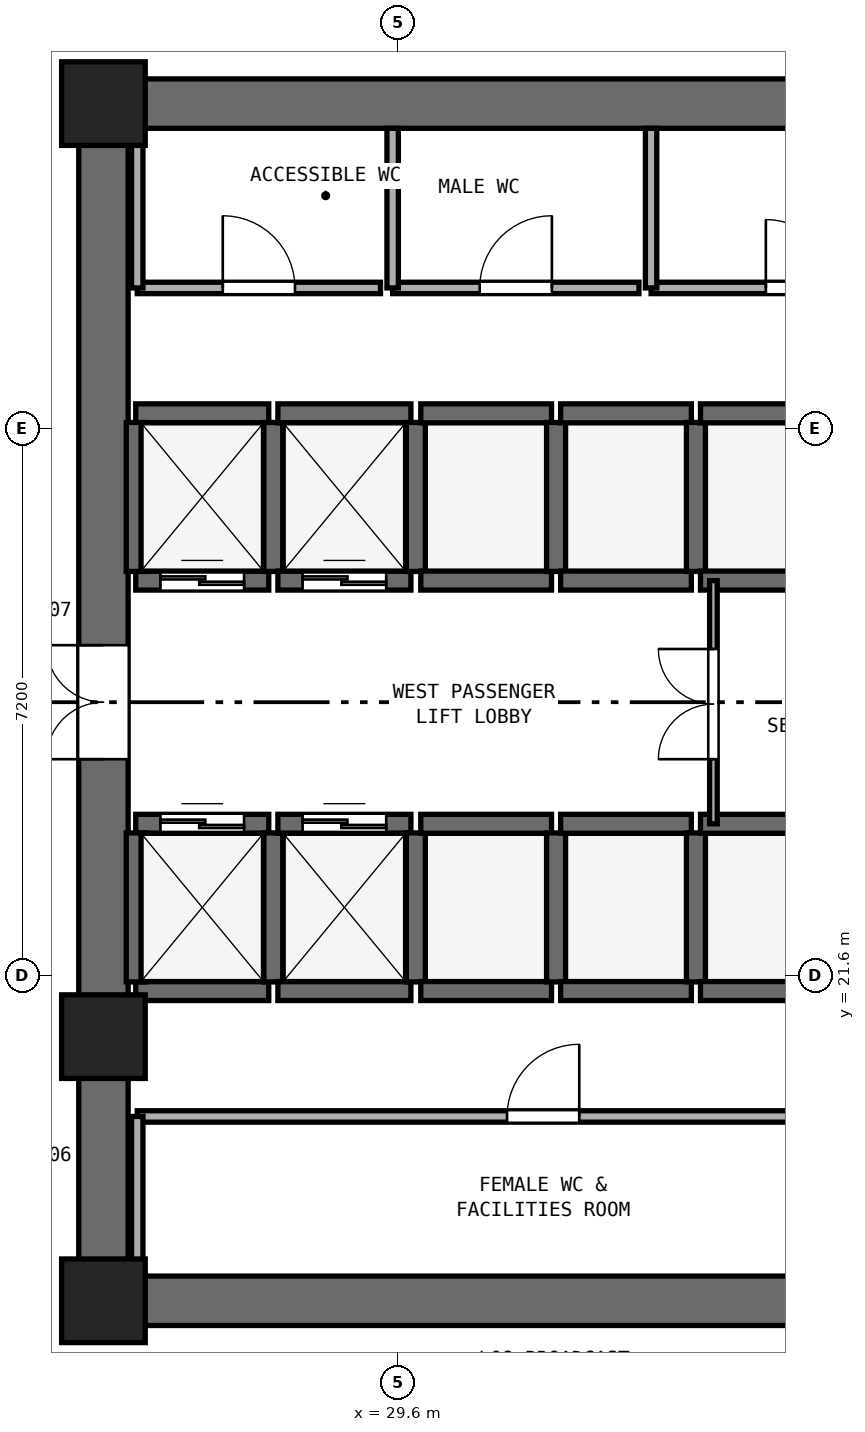
"""IFC4 building model, lengths in metres.
Left out: names, types, materials, properties, quantities, classifications, styles, units other than length and angle.
Written with IfcOpenShell. Run it as: python <this file> out.ifc"""

import sys

from ifc_helpers import new_model, si_unit, direction, frame, frame_2d, origin, origin_2d, place, context, subcontext, project, spatial, rectangle, extrude, element, fill, save


model = new_model("IFC4")
c1 = context("Model", 3, precision=1e-05, world=origin(), true_north=direction((0.0, 1.0)))
c2 = subcontext(c1, "Body", "Model", "MODEL_VIEW")
j1 = project(units=[si_unit("LENGTHUNIT", "METRE"), si_unit("PLANEANGLEUNIT", "RADIAN")], contexts=[c1])
p1 = place(None, origin())
s1 = spatial("IfcSite", under=j1, at=p1, CompositionType="ELEMENT")
p2 = place(p1, origin())
s2 = spatial("IfcBuilding", under=s1, at=p2, CompositionType="ELEMENT")
p3 = place(p2, frame((0.0, 0.0, 36.4)))
s3 = spatial("IfcBuildingStorey", under=s2, at=p3, CompositionType="ELEMENT", Elevation=36.4)
for number, where, z_axis, x_axis in (
    (1, (25.4, 17.325, 0.0), (0.0, 0.0, 1.0), (1.0, 0.0, 0.0)),
    (2, (25.4, 33.075, 0.0), (0.0, 0.0, 1.0), (1.0, 0.0, 0.0)),
):
    element("IfcWall", number, at=place(p3, frame(where, z_axis=z_axis, x_axis=x_axis)), inside=s3, PredefinedType="SHEAR", context=c2, shape_type="SweptSolid", body=[
        extrude(rectangle(XDim=23.2, YDim=0.65, at=frame_2d((11.6, 0.0))), origin(), (0.0, 0.0, 1.0), 3.525),
    ])
p4 = place(p3, frame((25.725, 17.65, 0.0), z_axis=(0.0, 0.0, 1.0), x_axis=(0.0, 1.0, 0.0)))
e3 = element("IfcWall", 3, at=p4, inside=s3, PredefinedType="SHEAR", context=c2, shape_type="SweptSolid", body=[
    extrude(rectangle(XDim=15.1, YDim=0.65, at=frame_2d((7.55, 0.0))), origin(), (0.0, 0.0, 1.0), 3.525),
])
p5 = place(p4, frame((6.8, 0.0, 0.0)))
e4 = element("IfcOpeningElement", 4, at=p5, cuts=e3, PredefinedType="OPENING", context=c2, shape_type="SweptSolid", body=[
    extrude(rectangle(XDim=1.5, YDim=2.15, at=frame_2d((0.75, 1.075))), frame((0.0, 0.335, 0.0), z_axis=(0.0, -1.0, 0.0), x_axis=(1.0, 0.0, 0.0)), (0.0, 0.0, 1.0), 0.67),
])
for number, where, z_axis, x_axis in (
    (5, (25.725, 17.325, 0.0), (0.0, 0.0, 1.0), (1.0, 0.0, 0.0)),
    (6, (25.725, 33.075, 0.0), (0.0, 0.0, 1.0), (1.0, 0.0, 0.0)),
    (7, (25.725, 20.8, 0.0), (0.0, 0.0, 1.0), (1.0, 0.0, 0.0)),
):
    element("IfcColumn", number, at=place(p3, frame(where, z_axis=z_axis, x_axis=x_axis)), inside=s3, PredefinedType="PILASTER", context=c2, shape_type="SweptSolid", body=[
        extrude(rectangle(XDim=1.1, YDim=1.1, at=origin_2d()), origin(), (0.0, 0.0, 1.0), 3.8),
    ])
p6 = place(p3, frame((26.15, 26.8, 0.0), z_axis=(0.0, 0.0, 1.0), x_axis=(1.0, 0.0, 0.0)))
e8 = element("IfcWall", 8, at=p6, inside=s3, PredefinedType="SHEAR", context=c2, shape_type="SweptSolid", body=[
    extrude(rectangle(XDim=1.75, YDim=0.25, at=frame_2d((0.875, 0.0))), origin(), (0.0, 0.0, 1.0), 3.525),
])
p7 = place(p6, frame((0.325, 0.0, 0.0)))
e9 = element("IfcOpeningElement", 9, at=p7, cuts=e8, PredefinedType="OPENING", context=c2, shape_type="SweptSolid", body=[
    extrude(rectangle(XDim=1.1, YDim=2.15, at=frame_2d((0.55, 1.075))), frame((0.0, 0.135, 0.0), z_axis=(0.0, -1.0, 0.0), x_axis=(1.0, 0.0, 0.0)), (0.0, 0.0, 1.0), 0.27),
])
p8 = place(p3, frame((26.15, 29.0, 0.0), z_axis=(0.0, 0.0, 1.0), x_axis=(1.0, 0.0, 0.0)))
e10 = element("IfcWall", 10, at=p8, inside=s3, PredefinedType="SHEAR", context=c2, shape_type="SweptSolid", body=[
    extrude(rectangle(XDim=1.75, YDim=0.25, at=frame_2d((0.875, 0.0))), origin(), (0.0, 0.0, 1.0), 3.525),
])
for number, where, z_axis, x_axis in (
    (11, (26.15, 26.92, 0.0), (0.0, 0.0, 1.0), (0.0, 1.0, 0.0)),
    (12, (27.96, 26.92, 0.0), (0.0, 0.0, 1.0), (0.0, 1.0, 0.0)),
):
    element("IfcWall", number, at=place(p3, frame(where, z_axis=z_axis, x_axis=x_axis)), inside=s3, PredefinedType="SHEAR", context=c2, shape_type="SweptSolid", body=[
        extrude(rectangle(XDim=1.96, YDim=0.25, at=frame_2d((0.98, 0.0))), origin(), (0.0, 0.0, 1.0), 3.525),
    ])
p9 = place(p3, frame((28.02, 26.8, 0.0), z_axis=(0.0, 0.0, 1.0), x_axis=(1.0, 0.0, 0.0)))
e13 = element("IfcWall", 13, at=p9, inside=s3, PredefinedType="SHEAR", context=c2, shape_type="SweptSolid", body=[
    extrude(rectangle(XDim=1.75, YDim=0.25, at=frame_2d((0.875, 0.0))), origin(), (0.0, 0.0, 1.0), 3.525),
])
p10 = place(p9, frame((0.325, 0.0, 0.0)))
e14 = element("IfcOpeningElement", 14, at=p10, cuts=e13, PredefinedType="OPENING", context=c2, shape_type="SweptSolid", body=[
    extrude(rectangle(XDim=1.1, YDim=2.15, at=frame_2d((0.55, 1.075))), frame((0.0, 0.135, 0.0), z_axis=(0.0, -1.0, 0.0), x_axis=(1.0, 0.0, 0.0)), (0.0, 0.0, 1.0), 0.27),
])
p11 = place(p3, frame((28.02, 29.0, 0.0), z_axis=(0.0, 0.0, 1.0), x_axis=(1.0, 0.0, 0.0)))
e15 = element("IfcWall", 15, at=p11, inside=s3, PredefinedType="SHEAR", context=c2, shape_type="SweptSolid", body=[
    extrude(rectangle(XDim=1.75, YDim=0.25, at=frame_2d((0.875, 0.0))), origin(), (0.0, 0.0, 1.0), 3.525),
])
p12 = place(p3, frame((29.835, 26.92, 0.0), z_axis=(0.0, 0.0, 1.0), x_axis=(0.0, 1.0, 0.0)))
e16 = element("IfcWall", 16, at=p12, inside=s3, PredefinedType="SHEAR", context=c2, shape_type="SweptSolid", body=[
    extrude(rectangle(XDim=1.96, YDim=0.25, at=frame_2d((0.98, 0.0))), origin(), (0.0, 0.0, 1.0), 3.525),
])
p13 = place(p3, frame((26.15, 21.4, 0.0), z_axis=(0.0, 0.0, 1.0), x_axis=(1.0, 0.0, 0.0)))
e17 = element("IfcWall", 17, at=p13, inside=s3, PredefinedType="SHEAR", context=c2, shape_type="SweptSolid", body=[
    extrude(rectangle(XDim=1.75, YDim=0.25, at=frame_2d((0.875, 0.0))), origin(), (0.0, 0.0, 1.0), 3.525),
])
p14 = place(p3, frame((26.15, 23.6, 0.0), z_axis=(0.0, 0.0, 1.0), x_axis=(1.0, 0.0, 0.0)))
e18 = element("IfcWall", 18, at=p14, inside=s3, PredefinedType="SHEAR", context=c2, shape_type="SweptSolid", body=[
    extrude(rectangle(XDim=1.75, YDim=0.25, at=frame_2d((0.875, 0.0))), origin(), (0.0, 0.0, 1.0), 3.525),
])
p15 = place(p14, frame((0.325, 0.0, 0.0)))
e19 = element("IfcOpeningElement", 19, at=p15, cuts=e18, PredefinedType="OPENING", context=c2, shape_type="SweptSolid", body=[
    extrude(rectangle(XDim=1.1, YDim=2.15, at=frame_2d((0.55, 1.075))), frame((0.0, 0.135, 0.0), z_axis=(0.0, -1.0, 0.0), x_axis=(1.0, 0.0, 0.0)), (0.0, 0.0, 1.0), 0.27),
])
for number, where, z_axis, x_axis in (
    (20, (26.15, 21.52, 0.0), (0.0, 0.0, 1.0), (0.0, 1.0, 0.0)),
    (21, (27.96, 21.52, 0.0), (0.0, 0.0, 1.0), (0.0, 1.0, 0.0)),
):
    element("IfcWall", number, at=place(p3, frame(where, z_axis=z_axis, x_axis=x_axis)), inside=s3, PredefinedType="SHEAR", context=c2, shape_type="SweptSolid", body=[
        extrude(rectangle(XDim=1.96, YDim=0.25, at=frame_2d((0.98, 0.0))), origin(), (0.0, 0.0, 1.0), 3.525),
    ])
p16 = place(p3, frame((28.02, 21.4, 0.0), z_axis=(0.0, 0.0, 1.0), x_axis=(1.0, 0.0, 0.0)))
e22 = element("IfcWall", 22, at=p16, inside=s3, PredefinedType="SHEAR", context=c2, shape_type="SweptSolid", body=[
    extrude(rectangle(XDim=1.75, YDim=0.25, at=frame_2d((0.875, 0.0))), origin(), (0.0, 0.0, 1.0), 3.525),
])
p17 = place(p3, frame((28.02, 23.6, 0.0), z_axis=(0.0, 0.0, 1.0), x_axis=(1.0, 0.0, 0.0)))
e23 = element("IfcWall", 23, at=p17, inside=s3, PredefinedType="SHEAR", context=c2, shape_type="SweptSolid", body=[
    extrude(rectangle(XDim=1.75, YDim=0.25, at=frame_2d((0.875, 0.0))), origin(), (0.0, 0.0, 1.0), 3.525),
])
p18 = place(p17, frame((0.325, 0.0, 0.0)))
e24 = element("IfcOpeningElement", 24, at=p18, cuts=e23, PredefinedType="OPENING", context=c2, shape_type="SweptSolid", body=[
    extrude(rectangle(XDim=1.1, YDim=2.15, at=frame_2d((0.55, 1.075))), frame((0.0, 0.135, 0.0), z_axis=(0.0, -1.0, 0.0), x_axis=(1.0, 0.0, 0.0)), (0.0, 0.0, 1.0), 0.27),
])
p19 = place(p3, frame((29.835, 21.52, 0.0), z_axis=(0.0, 0.0, 1.0), x_axis=(0.0, 1.0, 0.0)))
e25 = element("IfcWall", 25, at=p19, inside=s3, PredefinedType="SHEAR", context=c2, shape_type="SweptSolid", body=[
    extrude(rectangle(XDim=1.96, YDim=0.25, at=frame_2d((0.98, 0.0))), origin(), (0.0, 0.0, 1.0), 3.525),
])
for number, where, z_axis, x_axis in (
    (26, (29.9, 21.4, 0.0), (0.0, 0.0, 1.0), (1.0, 0.0, 0.0)),
    (27, (29.9, 23.6, 0.0), (0.0, 0.0, 1.0), (1.0, 0.0, 0.0)),
):
    element("IfcWall", number, at=place(p3, frame(where, z_axis=z_axis, x_axis=x_axis)), inside=s3, PredefinedType="SHEAR", context=c2, shape_type="SweptSolid", body=[
        extrude(rectangle(XDim=1.72, YDim=0.25, at=frame_2d((0.86, 0.0))), origin(), (0.0, 0.0, 1.0), 3.525),
    ])
p20 = place(p3, frame((31.68, 21.52, 0.0), z_axis=(0.0, 0.0, 1.0), x_axis=(0.0, 1.0, 0.0)))
e28 = element("IfcWall", 28, at=p20, inside=s3, PredefinedType="SHEAR", context=c2, shape_type="SweptSolid", body=[
    extrude(rectangle(XDim=1.96, YDim=0.25, at=frame_2d((0.98, 0.0))), origin(), (0.0, 0.0, 1.0), 3.525),
])
for number, where, z_axis, x_axis in (
    (29, (31.74, 21.4, 0.0), (0.0, 0.0, 1.0), (1.0, 0.0, 0.0)),
    (30, (31.74, 23.6, 0.0), (0.0, 0.0, 1.0), (1.0, 0.0, 0.0)),
):
    element("IfcWall", number, at=place(p3, frame(where, z_axis=z_axis, x_axis=x_axis)), inside=s3, PredefinedType="SHEAR", context=c2, shape_type="SweptSolid", body=[
        extrude(rectangle(XDim=1.72, YDim=0.25, at=frame_2d((0.86, 0.0))), origin(), (0.0, 0.0, 1.0), 3.525),
    ])
p21 = place(p3, frame((33.52, 21.52, 0.0), z_axis=(0.0, 0.0, 1.0), x_axis=(0.0, 1.0, 0.0)))
e31 = element("IfcWall", 31, at=p21, inside=s3, PredefinedType="SHEAR", context=c2, shape_type="SweptSolid", body=[
    extrude(rectangle(XDim=1.96, YDim=0.25, at=frame_2d((0.98, 0.0))), origin(), (0.0, 0.0, 1.0), 3.525),
])
for number, where, z_axis, x_axis in (
    (32, (33.58, 21.4, 0.0), (0.0, 0.0, 1.0), (1.0, 0.0, 0.0)),
    (33, (33.58, 23.6, 0.0), (0.0, 0.0, 1.0), (1.0, 0.0, 0.0)),
):
    element("IfcWall", number, at=place(p3, frame(where, z_axis=z_axis, x_axis=x_axis)), inside=s3, PredefinedType="SHEAR", context=c2, shape_type="SweptSolid", body=[
        extrude(rectangle(XDim=1.72, YDim=0.25, at=frame_2d((0.86, 0.0))), origin(), (0.0, 0.0, 1.0), 3.525),
    ])
for number, where, z_axis, x_axis in (
    (34, (29.9, 26.8, 0.0), (0.0, 0.0, 1.0), (1.0, 0.0, 0.0)),
    (35, (29.9, 29.0, 0.0), (0.0, 0.0, 1.0), (1.0, 0.0, 0.0)),
):
    element("IfcWall", number, at=place(p3, frame(where, z_axis=z_axis, x_axis=x_axis)), inside=s3, PredefinedType="SHEAR", context=c2, shape_type="SweptSolid", body=[
        extrude(rectangle(XDim=1.72, YDim=0.25, at=frame_2d((0.86, 0.0))), origin(), (0.0, 0.0, 1.0), 3.525),
    ])
p22 = place(p3, frame((31.68, 26.92, 0.0), z_axis=(0.0, 0.0, 1.0), x_axis=(0.0, 1.0, 0.0)))
e36 = element("IfcWall", 36, at=p22, inside=s3, PredefinedType="SHEAR", context=c2, shape_type="SweptSolid", body=[
    extrude(rectangle(XDim=1.96, YDim=0.25, at=frame_2d((0.98, 0.0))), origin(), (0.0, 0.0, 1.0), 3.525),
])
for number, where, z_axis, x_axis in (
    (37, (31.74, 26.8, 0.0), (0.0, 0.0, 1.0), (1.0, 0.0, 0.0)),
    (38, (31.74, 29.0, 0.0), (0.0, 0.0, 1.0), (1.0, 0.0, 0.0)),
):
    element("IfcWall", number, at=place(p3, frame(where, z_axis=z_axis, x_axis=x_axis)), inside=s3, PredefinedType="SHEAR", context=c2, shape_type="SweptSolid", body=[
        extrude(rectangle(XDim=1.72, YDim=0.25, at=frame_2d((0.86, 0.0))), origin(), (0.0, 0.0, 1.0), 3.525),
    ])
p23 = place(p3, frame((33.52, 26.92, 0.0), z_axis=(0.0, 0.0, 1.0), x_axis=(0.0, 1.0, 0.0)))
e39 = element("IfcWall", 39, at=p23, inside=s3, PredefinedType="SHEAR", context=c2, shape_type="SweptSolid", body=[
    extrude(rectangle(XDim=1.96, YDim=0.25, at=frame_2d((0.98, 0.0))), origin(), (0.0, 0.0, 1.0), 3.525),
])
for number, where, z_axis, x_axis in (
    (40, (33.58, 26.8, 0.0), (0.0, 0.0, 1.0), (1.0, 0.0, 0.0)),
    (41, (33.58, 29.0, 0.0), (0.0, 0.0, 1.0), (1.0, 0.0, 0.0)),
):
    element("IfcWall", number, at=place(p3, frame(where, z_axis=z_axis, x_axis=x_axis)), inside=s3, PredefinedType="SHEAR", context=c2, shape_type="SweptSolid", body=[
        extrude(rectangle(XDim=1.72, YDim=0.25, at=frame_2d((0.86, 0.0))), origin(), (0.0, 0.0, 1.0), 3.525),
    ])
p24 = place(p3, frame((26.17, 30.65, 0.0), z_axis=(0.0, 0.0, 1.0), x_axis=(1.0, 0.0, 0.0)))
e42 = element("IfcWall", 42, at=p24, inside=s3, PredefinedType="PARTITIONING", context=c2, shape_type="SweptSolid", body=[
    extrude(rectangle(XDim=3.2, YDim=0.15, at=frame_2d((1.6, 0.0))), origin(), (0.0, 0.0, 1.0), 3.525),
])
p25 = place(p24, frame((1.125, 0.0, 0.0)))
e43 = element("IfcOpeningElement", 43, at=p25, cuts=e42, PredefinedType="OPENING", context=c2, shape_type="SweptSolid", body=[
    extrude(rectangle(XDim=0.95, YDim=2.1, at=frame_2d((0.475, 1.05))), frame((0.0, 0.085, 0.0), z_axis=(0.0, -1.0, 0.0), x_axis=(1.0, 0.0, 0.0)), (0.0, 0.0, 1.0), 0.17),
])
p26 = place(p3, frame((26.17, 30.65, 0.0), z_axis=(0.0, 0.0, 1.0), x_axis=(0.0, 1.0, 0.0)))
e44 = element("IfcWall", 44, at=p26, inside=s3, PredefinedType="PARTITIONING", context=c2, shape_type="SweptSolid", body=[
    extrude(rectangle(XDim=2.1, YDim=0.15, at=frame_2d((1.05, 0.0))), origin(), (0.0, 0.0, 1.0), 3.525),
])
p27 = place(p3, frame((29.53, 30.65, 0.0), z_axis=(0.0, 0.0, 1.0), x_axis=(1.0, 0.0, 0.0)))
e45 = element("IfcWall", 45, at=p27, inside=s3, PredefinedType="PARTITIONING", context=c2, shape_type="SweptSolid", body=[
    extrude(rectangle(XDim=3.24, YDim=0.15, at=frame_2d((1.62, 0.0))), origin(), (0.0, 0.0, 1.0), 3.525),
])
p28 = place(p27, frame((1.145, 0.0, 0.0)))
e46 = element("IfcOpeningElement", 46, at=p28, cuts=e45, PredefinedType="OPENING", context=c2, shape_type="SweptSolid", body=[
    extrude(rectangle(XDim=0.95, YDim=2.1, at=frame_2d((0.475, 1.05))), frame((0.0, 0.085, 0.0), z_axis=(0.0, -1.0, 0.0), x_axis=(1.0, 0.0, 0.0)), (0.0, 0.0, 1.0), 0.17),
])
p29 = place(p3, frame((29.53, 30.65, 0.0), z_axis=(0.0, 0.0, 1.0), x_axis=(0.0, 1.0, 0.0)))
e47 = element("IfcWall", 47, at=p29, inside=s3, PredefinedType="PARTITIONING", context=c2, shape_type="SweptSolid", body=[
    extrude(rectangle(XDim=2.1, YDim=0.15, at=frame_2d((1.05, 0.0))), origin(), (0.0, 0.0, 1.0), 3.525),
])
p30 = place(p3, frame((32.93, 30.65, 0.0), z_axis=(0.0, 0.0, 1.0), x_axis=(1.0, 0.0, 0.0)))
e48 = element("IfcWall", 48, at=p30, inside=s3, PredefinedType="PARTITIONING", context=c2, shape_type="SweptSolid", body=[
    extrude(rectangle(XDim=3.92, YDim=0.15, at=frame_2d((1.96, 0.0))), origin(), (0.0, 0.0, 1.0), 3.525),
])
p31 = place(p30, frame((1.51, 0.0, 0.0)))
e49 = element("IfcOpeningElement", 49, at=p31, cuts=e48, PredefinedType="OPENING", context=c2, shape_type="SweptSolid", body=[
    extrude(rectangle(XDim=0.9, YDim=2.1, at=frame_2d((0.45, 1.05))), frame((0.0, 0.085, 0.0), z_axis=(0.0, -1.0, 0.0), x_axis=(1.0, 0.0, 0.0)), (0.0, 0.0, 1.0), 0.17),
])
p32 = place(p3, frame((32.93, 30.65, 0.0), z_axis=(0.0, 0.0, 1.0), x_axis=(0.0, 1.0, 0.0)))
e50 = element("IfcWall", 50, at=p32, inside=s3, PredefinedType="PARTITIONING", context=c2, shape_type="SweptSolid", body=[
    extrude(rectangle(XDim=2.1, YDim=0.15, at=frame_2d((1.05, 0.0))), origin(), (0.0, 0.0, 1.0), 3.525),
])
p33 = place(p3, frame((26.17, 19.75, 0.0), z_axis=(0.0, 0.0, 1.0), x_axis=(1.0, 0.0, 0.0)))
e51 = element("IfcWall", 51, at=p33, inside=s3, PredefinedType="PARTITIONING", context=c2, shape_type="SweptSolid", body=[
    extrude(rectangle(XDim=10.68, YDim=0.15, at=frame_2d((5.34, 0.0))), origin(), (0.0, 0.0, 1.0), 3.525),
])
p34 = place(p33, frame((4.865, 0.0, 0.0)))
e52 = element("IfcOpeningElement", 52, at=p34, cuts=e51, PredefinedType="OPENING", context=c2, shape_type="SweptSolid", body=[
    extrude(rectangle(XDim=0.95, YDim=2.1, at=frame_2d((0.475, 1.05))), frame((0.0, 0.085, 0.0), z_axis=(0.0, -1.0, 0.0), x_axis=(1.0, 0.0, 0.0)), (0.0, 0.0, 1.0), 0.17),
])
p35 = place(p3, frame((26.17, 17.65, 0.0), z_axis=(0.0, 0.0, 1.0), x_axis=(0.0, 1.0, 0.0)))
e53 = element("IfcWall", 53, at=p35, inside=s3, PredefinedType="PARTITIONING", context=c2, shape_type="SweptSolid", body=[
    extrude(rectangle(XDim=2.1, YDim=0.15, at=frame_2d((1.05, 0.0))), origin(), (0.0, 0.0, 1.0), 3.525),
])
p36 = place(p3, frame((33.75, 23.6, 0.0), z_axis=(0.0, 0.0, 1.0), x_axis=(0.0, 1.0, 0.0)))
e54 = element("IfcWall", 54, at=p36, inside=s3, PredefinedType="PARTITIONING", context=c2, shape_type="SweptSolid", body=[
    extrude(rectangle(XDim=3.2, YDim=0.1, at=frame_2d((1.6, 0.0))), origin(), (0.0, 0.0, 1.0), 3.525),
])
p37 = place(p36, frame((0.85, 0.0, 0.0)))
e55 = element("IfcOpeningElement", 55, at=p37, cuts=e54, PredefinedType="OPENING", context=c2, shape_type="SweptSolid", body=[
    extrude(rectangle(XDim=1.45, YDim=2.12, at=frame_2d((0.725, 1.06))), frame((0.0, 0.06, 0.0), z_axis=(0.0, -1.0, 0.0), x_axis=(1.0, 0.0, 0.0)), (0.0, 0.0, 1.0), 0.12),
])
p38 = place(p7, origin())
e56 = element("IfcDoor", 56, at=p38, inside=s3, OperationType="DOUBLE_DOOR_SLIDING", PredefinedType="DOOR", context=c2, shape_type="SweptSolid", body=[
    extrude(rectangle(XDim=1.1, YDim=2.15, at=frame_2d((0.55, 1.075))), frame((0.0, 0.025, 0.0), z_axis=(0.0, -1.0, 0.0), x_axis=(1.0, 0.0, 0.0)), (0.0, 0.0, 1.0), 0.05),
])
fill(e9, e56)
p39 = place(p10, origin())
e57 = element("IfcDoor", 57, at=p39, inside=s3, OperationType="DOUBLE_DOOR_SLIDING", PredefinedType="DOOR", context=c2, shape_type="SweptSolid", body=[
    extrude(rectangle(XDim=1.1, YDim=2.15, at=frame_2d((0.55, 1.075))), frame((0.0, 0.025, 0.0), z_axis=(0.0, -1.0, 0.0), x_axis=(1.0, 0.0, 0.0)), (0.0, 0.0, 1.0), 0.05),
])
fill(e14, e57)
p40 = place(p15, origin())
e58 = element("IfcDoor", 58, at=p40, inside=s3, OperationType="DOUBLE_DOOR_SLIDING", PredefinedType="DOOR", context=c2, shape_type="SweptSolid", body=[
    extrude(rectangle(XDim=1.1, YDim=2.15, at=frame_2d((0.55, 1.075))), frame((0.0, 0.025, 0.0), z_axis=(0.0, -1.0, 0.0), x_axis=(1.0, 0.0, 0.0)), (0.0, 0.0, 1.0), 0.05),
])
fill(e19, e58)
p41 = place(p18, origin())
e59 = element("IfcDoor", 59, at=p41, inside=s3, OperationType="DOUBLE_DOOR_SLIDING", PredefinedType="DOOR", context=c2, shape_type="SweptSolid", body=[
    extrude(rectangle(XDim=1.1, YDim=2.15, at=frame_2d((0.55, 1.075))), frame((0.0, 0.025, 0.0), z_axis=(0.0, -1.0, 0.0), x_axis=(1.0, 0.0, 0.0)), (0.0, 0.0, 1.0), 0.05),
])
fill(e24, e59)
p42 = place(p5, origin())
e60 = element("IfcDoor", 60, at=p42, inside=s3, OperationType="DOUBLE_DOOR_SINGLE_SWING", PredefinedType="DOOR", context=c2, shape_type="SweptSolid", body=[
    extrude(rectangle(XDim=1.5, YDim=2.15, at=frame_2d((0.75, 1.075))), frame((0.0, 0.025, 0.0), z_axis=(0.0, -1.0, 0.0), x_axis=(1.0, 0.0, 0.0)), (0.0, 0.0, 1.0), 0.05),
])
fill(e4, e60)
p43 = place(p25, origin())
e61 = element("IfcDoor", 61, at=p43, inside=s3, OperationType="SINGLE_SWING_LEFT", PredefinedType="DOOR", context=c2, shape_type="SweptSolid", body=[
    extrude(rectangle(XDim=0.95, YDim=2.1, at=frame_2d((0.475, 1.05))), frame((0.0, 0.025, 0.0), z_axis=(0.0, -1.0, 0.0), x_axis=(1.0, 0.0, 0.0)), (0.0, 0.0, 1.0), 0.05),
])
fill(e43, e61)
p44 = place(p28, origin())
e62 = element("IfcDoor", 62, at=p44, inside=s3, OperationType="SINGLE_SWING_RIGHT", PredefinedType="DOOR", context=c2, shape_type="SweptSolid", body=[
    extrude(rectangle(XDim=0.95, YDim=2.1, at=frame_2d((0.475, 1.05))), frame((0.0, 0.025, 0.0), z_axis=(0.0, -1.0, 0.0), x_axis=(1.0, 0.0, 0.0)), (0.0, 0.0, 1.0), 0.05),
])
fill(e46, e62)
p45 = place(p31, origin())
e63 = element("IfcDoor", 63, at=p45, inside=s3, OperationType="SINGLE_SWING_LEFT", PredefinedType="DOOR", context=c2, shape_type="SweptSolid", body=[
    extrude(rectangle(XDim=0.9, YDim=2.1, at=frame_2d((0.45, 1.05))), frame((0.0, 0.025, 0.0), z_axis=(0.0, -1.0, 0.0), x_axis=(1.0, 0.0, 0.0)), (0.0, 0.0, 1.0), 0.05),
])
fill(e49, e63)
p46 = place(p34, origin())
e64 = element("IfcDoor", 64, at=p46, inside=s3, OperationType="SINGLE_SWING_RIGHT", PredefinedType="DOOR", context=c2, shape_type="SweptSolid", body=[
    extrude(rectangle(XDim=0.95, YDim=2.1, at=frame_2d((0.475, 1.05))), frame((0.0, 0.025, 0.0), z_axis=(0.0, -1.0, 0.0), x_axis=(1.0, 0.0, 0.0)), (0.0, 0.0, 1.0), 0.05),
])
fill(e52, e64)
p47 = place(p37, origin())
e65 = element("IfcDoor", 65, at=p47, inside=s3, OperationType="DOUBLE_DOOR_SINGLE_SWING", PredefinedType="DOOR", context=c2, shape_type="SweptSolid", body=[
    extrude(rectangle(XDim=1.45, YDim=2.12, at=frame_2d((0.725, 1.06))), frame((0.0, 0.025, 0.0), z_axis=(0.0, -1.0, 0.0), x_axis=(1.0, 0.0, 0.0)), (0.0, 0.0, 1.0), 0.05),
])
fill(e55, e65)
save(model, sys.argv[1])
